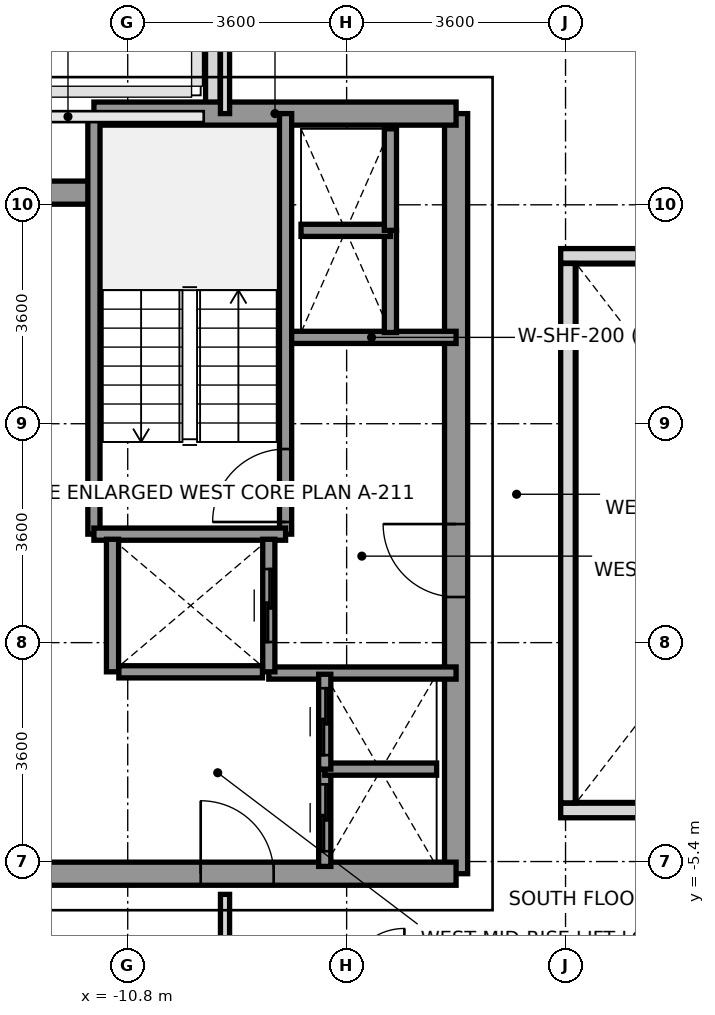
"""IFC4 building model, lengths in metres.
Left out: names, types, materials, properties, quantities, classifications, styles, units other than length and angle.
Written with IfcOpenShell. Run it as: python <this file> out.ifc"""

import sys

from ifc_helpers import new_model, si_unit, direction, frame, frame_2d, origin, place, context, subcontext, project, spatial, rectangle, extrude, source, transform, mapped, element, fill, save


model = new_model("IFC4")
c1 = context("Model", 3, precision=1e-05, world=origin(), true_north=direction((0.0, 1.0)))
c2 = subcontext(c1, "Body", "Model", "MODEL_VIEW")
j1 = project(units=[si_unit("LENGTHUNIT", "METRE"), si_unit("PLANEANGLEUNIT", "RADIAN")], contexts=[c1])
p1 = place(None, origin())
s1 = spatial("IfcSite", under=j1, at=p1, CompositionType="ELEMENT")
p2 = place(p1, origin())
s2 = spatial("IfcBuilding", under=s1, at=p2, CompositionType="ELEMENT")
p3 = place(p2, frame((0.0, 0.0, 174.0)))
s3 = spatial("IfcBuildingStorey", under=s2, at=p3, CompositionType="ELEMENT", Elevation=174.0)
p4 = place(p3, frame((-9.4, 6.953, 0.0), z_axis=(0.0, 0.0, 1.0), x_axis=(0.0, 1.0, 0.0)))
e1 = element("IfcWall", 1, at=p4, inside=s3, PredefinedType="PARAPET", context=c2, shape_type="SweptSolid", body=[
    extrude(rectangle(XDim=1.594, YDim=0.24, at=frame_2d((0.797, 0.0))), origin(), (0.0, 0.0, 1.0), 1.15),
])
p5 = place(p3, frame((-5.4, -5.6, 0.0), z_axis=(0.0, 0.0, 1.0), x_axis=(0.0, 1.0, 0.0)))
e2 = element("IfcWall", 2, at=p5, inside=s3, PredefinedType="SHEAR", context=c2, shape_type="SweptSolid", body=[
    extrude(rectangle(XDim=12.5, YDim=0.38, at=frame_2d((6.25, 0.0))), origin(), (0.0, 0.0, 1.0), 3.2),
])
p6 = place(p5, frame((4.55, 0.0, 0.0)))
e3 = element("IfcOpeningElement", 3, at=p6, cuts=e2, PredefinedType="OPENING", context=c2, shape_type="SweptSolid", body=[
    extrude(rectangle(XDim=1.2, YDim=2.2, at=frame_2d((0.6, 1.1))), frame((0.0, 0.2, 0.0), z_axis=(0.0, -1.0, 0.0), x_axis=(1.0, 0.0, 0.0)), (0.0, 0.0, 1.0), 0.4),
])
p7 = place(p3, frame((-11.356, 6.9, 0.0), z_axis=(0.0, 0.0, 1.0), x_axis=(1.0, 0.0, 0.0)))
e4 = element("IfcWall", 4, at=p7, inside=s3, PredefinedType="SHEAR", context=c2, shape_type="SweptSolid", body=[
    extrude(rectangle(XDim=5.956, YDim=0.38, at=frame_2d((2.978, 0.0))), origin(), (0.0, 0.0, 1.0), 3.2),
])
p8 = place(p3, frame((-13.2, 5.6, 0.0), z_axis=(0.0, 0.0, 1.0), x_axis=(1.0, 0.0, 0.0)))
e5 = element("IfcWall", 5, at=p8, inside=s3, PredefinedType="SHEAR", context=c2, shape_type="SweptSolid", body=[
    extrude(rectangle(XDim=1.844, YDim=0.38, at=frame_2d((0.922, 0.0))), origin(), (0.0, 0.0, 1.0), 3.2),
])
p9 = place(p3, frame((-13.2, -5.6, 0.0), z_axis=(0.0, 0.0, 1.0), x_axis=(1.0, 0.0, 0.0)))
e6 = element("IfcWall", 6, at=p9, inside=s3, PredefinedType="SHEAR", context=c2, shape_type="SweptSolid", body=[
    extrude(rectangle(XDim=7.8, YDim=0.38, at=frame_2d((3.9, 0.0))), origin(), (0.0, 0.0, 1.0), 3.2),
])
p10 = place(p9, frame((3.6, 0.0, 0.0)))
e7 = element("IfcOpeningElement", 7, at=p10, cuts=e6, PredefinedType="OPENING", context=c2, shape_type="SweptSolid", body=[
    extrude(rectangle(XDim=1.2, YDim=2.2, at=frame_2d((0.6, 1.1))), frame((0.0, 0.2, 0.0), z_axis=(0.0, -1.0, 0.0), x_axis=(1.0, 0.0, 0.0)), (0.0, 0.0, 1.0), 0.4),
])
p11 = place(p3, frame((-8.18, 3.22, 0.0), z_axis=(0.0, 0.0, 1.0), x_axis=(1.0, 0.0, 0.0)))
e8 = element("IfcWall", 8, at=p11, inside=s3, PredefinedType="SOLIDWALL", context=c2, shape_type="SweptSolid", body=[
    extrude(rectangle(XDim=2.78, YDim=0.2, at=frame_2d((1.39, 0.0))), origin(), (0.0, 0.0, 1.0), 3.2),
])
p12 = place(p3, frame((-8.48, -2.3, 0.0), z_axis=(0.0, 0.0, 1.0), x_axis=(1.0, 0.0, 0.0)))
e9 = element("IfcWall", 9, at=p12, inside=s3, PredefinedType="SOLIDWALL", context=c2, shape_type="SweptSolid", body=[
    extrude(rectangle(XDim=3.08, YDim=0.2, at=frame_2d((1.54, 0.0))), origin(), (0.0, 0.0, 1.0), 3.2),
])
p13 = place(p3, frame((-8.204, -0.016, 0.0), z_axis=(0.0, 0.0, 1.0), x_axis=(0.0, 1.0, 0.0)))
e10 = element("IfcWall", 10, at=p13, inside=s3, PredefinedType="SOLIDWALL", context=c2, shape_type="SweptSolid", body=[
    extrude(rectangle(XDim=6.916, YDim=0.2, at=frame_2d((3.458, 0.0))), origin(), (0.0, 0.0, 1.0), 3.2),
])
p14 = place(p13, frame((0.2, 0.0, 0.0)))
e11 = element("IfcOpeningElement", 11, at=p14, cuts=e10, PredefinedType="OPENING", context=c2, shape_type="SweptSolid", body=[
    extrude(rectangle(XDim=1.2, YDim=2.2, at=frame_2d((0.6, 1.1))), frame((0.0, 0.11, 0.0), z_axis=(0.0, -1.0, 0.0), x_axis=(1.0, 0.0, 0.0)), (0.0, 0.0, 1.0), 0.22),
])
p15 = place(p3, frame((-11.356, -0.016, 0.0), z_axis=(0.0, 0.0, 1.0), x_axis=(0.0, 1.0, 0.0)))
e12 = element("IfcWall", 12, at=p15, inside=s3, PredefinedType="SOLIDWALL", context=c2, shape_type="SweptSolid", body=[
    extrude(rectangle(XDim=6.916, YDim=0.2, at=frame_2d((3.458, 0.0))), origin(), (0.0, 0.0, 1.0), 3.2),
])
p16 = place(p3, frame((-11.356, -0.016, 0.0), z_axis=(0.0, 0.0, 1.0), x_axis=(1.0, 0.0, 0.0)))
e13 = element("IfcWall", 13, at=p16, inside=s3, PredefinedType="SOLIDWALL", context=c2, shape_type="SweptSolid", body=[
    extrude(rectangle(XDim=3.152, YDim=0.2, at=frame_2d((1.576, 0.0))), origin(), (0.0, 0.0, 1.0), 3.2),
])
p17 = place(p3, frame((-11.05, -2.28, 0.0), z_axis=(0.0, 0.0, 1.0), x_axis=(0.0, 1.0, 0.0)))
e14 = element("IfcWall", 14, at=p17, inside=s3, PredefinedType="SOLIDWALL", context=c2, shape_type="SweptSolid", body=[
    extrude(rectangle(XDim=2.18, YDim=0.2, at=frame_2d((1.09, 0.0))), origin(), (0.0, 0.0, 1.0), 3.2),
])
p18 = place(p3, frame((-8.48, -2.28, 0.0), z_axis=(0.0, 0.0, 1.0), x_axis=(0.0, 1.0, 0.0)))
e15 = element("IfcWall", 15, at=p18, inside=s3, PredefinedType="SOLIDWALL", context=c2, shape_type="SweptSolid", body=[
    extrude(rectangle(XDim=2.18, YDim=0.2, at=frame_2d((1.09, 0.0))), origin(), (0.0, 0.0, 1.0), 3.2),
])
p19 = place(p18, frame((0.49, 0.0, 0.0)))
e16 = element("IfcOpeningElement", 16, at=p19, cuts=e15, PredefinedType="OPENING", context=c2, shape_type="SweptSolid", body=[
    extrude(rectangle(XDim=1.2, YDim=2.2, at=frame_2d((0.6, 1.1))), frame((0.0, 0.11, 0.0), z_axis=(0.0, -1.0, 0.0), x_axis=(1.0, 0.0, 0.0)), (0.0, 0.0, 1.0), 0.22),
])
p20 = place(p3, frame((-10.946, -2.28, 0.0), z_axis=(0.0, 0.0, 1.0), x_axis=(1.0, 0.0, 0.0)))
e17 = element("IfcWall", 17, at=p20, inside=s3, PredefinedType="SOLIDWALL", context=c2, shape_type="SweptSolid", body=[
    extrude(rectangle(XDim=2.362, YDim=0.2, at=frame_2d((1.181, 0.0))), origin(), (0.0, 0.0, 1.0), 3.2),
])
p21 = place(p3, frame((-7.56, -5.48, 0.0), z_axis=(0.0, 0.0, 1.0), x_axis=(0.0, 1.0, 0.0)))
e18 = element("IfcWall", 18, at=p21, inside=s3, PredefinedType="SOLIDWALL", context=c2, shape_type="SweptSolid", body=[
    extrude(rectangle(XDim=1.6, YDim=0.2, at=frame_2d((0.8, 0.0))), origin(), (0.0, 0.0, 1.0), 3.2),
])
p22 = place(p21, frame((0.25, 0.0, 0.0)))
e19 = element("IfcOpeningElement", 19, at=p22, cuts=e18, PredefinedType="OPENING", context=c2, shape_type="SweptSolid", body=[
    extrude(rectangle(XDim=1.1, YDim=2.2, at=frame_2d((0.55, 1.1))), frame((0.0, 0.11, 0.0), z_axis=(0.0, -1.0, 0.0), x_axis=(1.0, 0.0, 0.0)), (0.0, 0.0, 1.0), 0.22),
])
p23 = place(p3, frame((-7.56, -3.88, 0.0), z_axis=(0.0, 0.0, 1.0), x_axis=(1.0, 0.0, 0.0)))
e20 = element("IfcWall", 20, at=p23, inside=s3, PredefinedType="SOLIDWALL", context=c2, shape_type="SweptSolid", body=[
    extrude(rectangle(XDim=1.84, YDim=0.2, at=frame_2d((0.92, 0.0))), origin(), (0.0, 0.0, 1.0), 3.2),
])
p24 = place(p3, frame((-7.56, -3.88, 0.0), z_axis=(0.0, 0.0, 1.0), x_axis=(0.0, 1.0, 0.0)))
e21 = element("IfcWall", 21, at=p24, inside=s3, PredefinedType="SOLIDWALL", context=c2, shape_type="SweptSolid", body=[
    extrude(rectangle(XDim=1.56, YDim=0.2, at=frame_2d((0.78, 0.0))), origin(), (0.0, 0.0, 1.0), 3.2),
])
p25 = place(p24, frame((0.23, 0.0, 0.0)))
e22 = element("IfcOpeningElement", 22, at=p25, cuts=e21, PredefinedType="OPENING", context=c2, shape_type="SweptSolid", body=[
    extrude(rectangle(XDim=1.1, YDim=2.2, at=frame_2d((0.55, 1.1))), frame((0.0, 0.11, 0.0), z_axis=(0.0, -1.0, 0.0), x_axis=(1.0, 0.0, 0.0)), (0.0, 0.0, 1.0), 0.22),
])
p26 = place(p3, frame((-6.48, 3.3, 0.0), z_axis=(0.0, 0.0, 1.0), x_axis=(0.0, 1.0, 0.0)))
e23 = element("IfcWall", 23, at=p26, inside=s3, PredefinedType="SOLIDWALL", context=c2, shape_type="SweptSolid", body=[
    extrude(rectangle(XDim=1.68, YDim=0.2, at=frame_2d((0.84, 0.0))), origin(), (0.0, 0.0, 1.0), 3.2),
])
p27 = place(p3, frame((-7.95, 4.98, 0.0), z_axis=(0.0, 0.0, 1.0), x_axis=(1.0, 0.0, 0.0)))
e24 = element("IfcWall", 24, at=p27, inside=s3, PredefinedType="SOLIDWALL", context=c2, shape_type="SweptSolid", body=[
    extrude(rectangle(XDim=1.47, YDim=0.2, at=frame_2d((0.735, 0.0))), origin(), (0.0, 0.0, 1.0), 3.2),
])
p28 = place(p3, frame((-6.48, 4.98, 0.0), z_axis=(0.0, 0.0, 1.0), x_axis=(0.0, 1.0, 0.0)))
e25 = element("IfcWall", 25, at=p28, inside=s3, PredefinedType="SOLIDWALL", context=c2, shape_type="SweptSolid", body=[
    extrude(rectangle(XDim=1.67, YDim=0.2, at=frame_2d((0.835, 0.0))), origin(), (0.0, 0.0, 1.0), 3.2),
])
p29 = place(p3, frame((-9.2, 6.9, 0.0), z_axis=(0.0, 0.0, 1.0), x_axis=(0.0, 1.0, 0.0)))
e26 = element("IfcWall", 26, at=p29, inside=s3, PredefinedType="PARTITIONING", context=c2, shape_type="SweptSolid", body=[
    extrude(rectangle(XDim=8.78, YDim=0.15, at=frame_2d((4.39, 0.0))), origin(), (0.0, 0.0, 1.0), 2.75),
])
p30 = place(p3, frame((-9.2, -15.68, 0.0), z_axis=(0.0, 0.0, 1.0), x_axis=(0.0, 1.0, 0.0)))
e27 = element("IfcWall", 27, at=p30, inside=s3, PredefinedType="PARTITIONING", context=c2, shape_type="SweptSolid", body=[
    extrude(rectangle(XDim=9.74, YDim=0.15, at=frame_2d((4.87, 0.0))), origin(), (0.0, 0.0, 1.0), 2.75),
])
for number, where, z_axis, x_axis in (
    (28, (-3.68, -4.56, 0.0), (0.0, 0.0, 1.0), (1.0, 0.0, 0.0)),
    (29, (-3.68, 4.56, 0.0), (0.0, 0.0, 1.0), (1.0, 0.0, 0.0)),
):
    element("IfcWall", number, at=place(p3, frame(where, z_axis=z_axis, x_axis=x_axis)), inside=s3, PredefinedType="PARAPET", context=c2, shape_type="SweptSolid", body=[
        extrude(rectangle(XDim=7.36, YDim=0.24, at=frame_2d((3.68, 0.0))), origin(), (0.0, 0.0, 1.0), 1.15),
    ])
p31 = place(p3, frame((-3.56, -4.435, 0.0), z_axis=(0.0, 0.0, 1.0), x_axis=(0.0, 1.0, 0.0)))
e30 = element("IfcWall", 30, at=p31, inside=s3, PredefinedType="PARAPET", context=c2, shape_type="SweptSolid", body=[
    extrude(rectangle(XDim=8.87, YDim=0.24, at=frame_2d((4.435, 0.0))), origin(), (0.0, 0.0, 1.0), 1.15),
])
m1 = source(origin(), c2, "Body", "SweptSolid", [
    extrude(rectangle(XDim=1.2, YDim=2.2, at=frame_2d((0.6, 1.1))), frame((0.0, 0.025, 0.0), z_axis=(0.0, -1.0, 0.0), x_axis=(1.0, 0.0, 0.0)), (0.0, 0.0, 1.0), 0.05),
])
p32 = place(p14, origin())
e31 = element("IfcDoor", 31, at=p32, inside=s3, OperationType="SINGLE_SWING_LEFT", PredefinedType="DOOR", context=c2, shape_type="MappedRepresentation", body=[
    mapped(m1, transform((0.0, 0.0, 0.0), x_axis=(1.0, 0.0, 0.0), y_axis=(0.0, 1.0, 0.0), z_axis=(0.0, 0.0, 1.0), scale=1.0)),
])
fill(e11, e31)
p33 = place(p6, origin())
e32 = element("IfcDoor", 32, at=p33, inside=s3, OperationType="SINGLE_SWING_RIGHT", PredefinedType="DOOR", context=c2, shape_type="MappedRepresentation", body=[
    mapped(m1, transform((0.0, 0.0, 0.0), x_axis=(1.0, 0.0, 0.0), y_axis=(0.0, 1.0, 0.0), z_axis=(0.0, 0.0, 1.0), scale=1.0)),
])
fill(e3, e32)
p34 = place(p10, origin())
e33 = element("IfcDoor", 33, at=p34, inside=s3, OperationType="SINGLE_SWING_LEFT", PredefinedType="DOOR", context=c2, shape_type="MappedRepresentation", body=[
    mapped(m1, transform((0.0, 0.0, 0.0), x_axis=(1.0, 0.0, 0.0), y_axis=(0.0, 1.0, 0.0), z_axis=(0.0, 0.0, 1.0), scale=1.0)),
])
fill(e7, e33)
p35 = place(p19, origin())
e34 = element("IfcDoor", 34, at=p35, inside=s3, OperationType="SLIDING_TO_RIGHT", PredefinedType="DOOR", context=c2, shape_type="MappedRepresentation", body=[
    mapped(m1, transform((0.0, 0.0, 0.0), x_axis=(1.0, 0.0, 0.0), y_axis=(0.0, 1.0, 0.0), z_axis=(0.0, 0.0, 1.0), scale=1.0)),
])
fill(e16, e34)
m2 = source(origin(), c2, "Body", "SweptSolid", [
    extrude(rectangle(XDim=1.1, YDim=2.2, at=frame_2d((0.55, 1.1))), frame((0.0, 0.025, 0.0), z_axis=(0.0, -1.0, 0.0), x_axis=(1.0, 0.0, 0.0)), (0.0, 0.0, 1.0), 0.05),
])
p36 = place(p22, origin())
e35 = element("IfcDoor", 35, at=p36, inside=s3, OperationType="SLIDING_TO_LEFT", PredefinedType="DOOR", context=c2, shape_type="MappedRepresentation", body=[
    mapped(m2, transform((0.0, 0.0, 0.0), x_axis=(1.0, 0.0, 0.0), y_axis=(0.0, 1.0, 0.0), z_axis=(0.0, 0.0, 1.0), scale=1.0)),
])
fill(e19, e35)
p37 = place(p25, origin())
e36 = element("IfcDoor", 36, at=p37, inside=s3, OperationType="SLIDING_TO_LEFT", PredefinedType="DOOR", context=c2, shape_type="MappedRepresentation", body=[
    mapped(m2, transform((0.0, 0.0, 0.0), x_axis=(1.0, 0.0, 0.0), y_axis=(0.0, 1.0, 0.0), z_axis=(0.0, 0.0, 1.0), scale=1.0)),
])
fill(e22, e36)
save(model, sys.argv[1])
